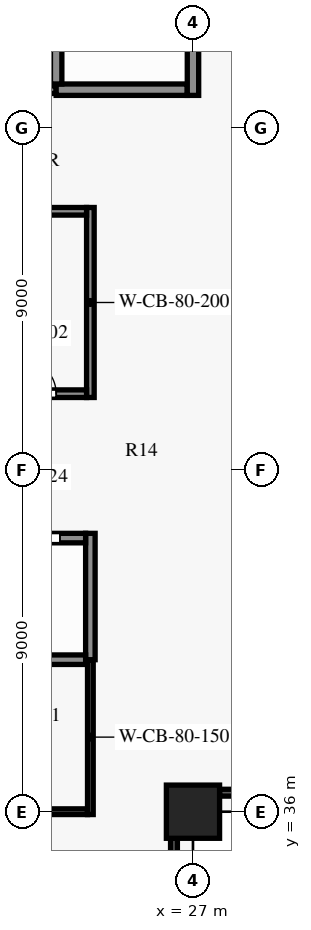
"""IFC4 building model, lengths in metres.
Left out: names, types, materials, properties, quantities, classifications, styles, units other than length and angle.
Written with IfcOpenShell. Run it as: python <this file> out.ifc"""

import sys

from ifc_helpers import new_model, si_unit, direction, frame, frame_2d, origin, origin_2d, place, context, subcontext, project, spatial, rectangle, extrude, element, fill, save


model = new_model("IFC4")
c1 = context("Model", 3, precision=1e-05, world=origin(), true_north=direction((0.0, 1.0)))
c2 = subcontext(c1, "Body", "Model", "MODEL_VIEW")
j1 = project(units=[si_unit("LENGTHUNIT", "METRE"), si_unit("PLANEANGLEUNIT", "RADIAN")], contexts=[c1])
p1 = place(None, origin())
s1 = spatial("IfcSite", under=j1, at=p1, CompositionType="ELEMENT")
p2 = place(p1, origin())
s2 = spatial("IfcBuilding", under=s1, at=p2, CompositionType="ELEMENT")
p3 = place(p2, frame((0.0, 0.0, 19.5)))
s3 = spatial("IfcBuildingStorey", under=s2, at=p3, CompositionType="ELEMENT", Elevation=19.5)
p4 = place(p3, frame((27.0, 36.0, 0.0), z_axis=(0.0, 0.0, 1.0), x_axis=(1.0, 0.0, 0.0)))
e1 = element("IfcColumn", 1, at=p4, inside=s3, PredefinedType="COLUMN", context=c2, shape_type="SweptSolid", body=[
    extrude(rectangle(XDim=1.4, YDim=1.4, at=origin_2d()), origin(), (0.0, 0.0, 1.0), 8.0),
])
p5 = place(p3, frame((12.4, 36.0, 0.0), z_axis=(0.0, 0.0, 1.0), x_axis=(1.0, 0.0, 0.0)))
e2 = element("IfcWall", 2, at=p5, inside=s3, PredefinedType="SHEAR", context=c2, shape_type="SweptSolid", body=[
    extrude(rectangle(XDim=11.825, YDim=0.15, at=frame_2d((5.913, 0.0))), origin(), (0.0, 0.0, 1.0), 7.7),
])
p6 = place(p5, frame((1.3, 0.0, 0.0)))
e3 = element("IfcOpeningElement", 3, at=p6, cuts=e2, PredefinedType="OPENING", context=c2, shape_type="SweptSolid", body=[
    extrude(rectangle(XDim=0.9, YDim=2.1, at=frame_2d((0.45, 1.05))), frame((0.0, 0.085, 0.0), z_axis=(0.0, -1.0, 0.0), x_axis=(1.0, 0.0, 0.0)), (0.0, 0.0, 1.0), 0.17),
])
p7 = place(p5, frame((4.8, 0.0, 0.0)))
e4 = element("IfcOpeningElement", 4, at=p7, cuts=e2, PredefinedType="OPENING", context=c2, shape_type="SweptSolid", body=[
    extrude(rectangle(XDim=0.9, YDim=2.1, at=frame_2d((0.45, 1.05))), frame((0.0, 0.085, 0.0), z_axis=(0.0, -1.0, 0.0), x_axis=(1.0, 0.0, 0.0)), (0.0, 0.0, 1.0), 0.17),
])
p8 = place(p5, frame((8.975, 0.0, 0.0)))
e5 = element("IfcOpeningElement", 5, at=p8, cuts=e2, PredefinedType="OPENING", context=c2, shape_type="SweptSolid", body=[
    extrude(rectangle(XDim=0.95, YDim=2.1, at=frame_2d((0.475, 1.05))), frame((0.0, 0.085, 0.0), z_axis=(0.0, -1.0, 0.0), x_axis=(1.0, 0.0, 0.0)), (0.0, 0.0, 1.0), 0.17),
])
p9 = place(p3, frame((8.1, 40.0, 0.0), z_axis=(0.0, 0.0, 1.0), x_axis=(1.0, 0.0, 0.0)))
e6 = element("IfcWall", 6, at=p9, inside=s3, PredefinedType="SHEAR", context=c2, shape_type="SweptSolid", body=[
    extrude(rectangle(XDim=16.075, YDim=0.25, at=frame_2d((8.038, 0.0))), origin(), (0.0, 0.0, 1.0), 7.7),
])
p10 = place(p3, frame((8.1, 43.2, 0.0), z_axis=(0.0, 0.0, 1.0), x_axis=(1.0, 0.0, 0.0)))
e7 = element("IfcWall", 7, at=p10, inside=s3, PredefinedType="SHEAR", context=c2, shape_type="SweptSolid", body=[
    extrude(rectangle(XDim=16.075, YDim=0.25, at=frame_2d((8.038, 0.0))), origin(), (0.0, 0.0, 1.0), 7.7),
])
p11 = place(p10, frame((14.3, 0.0, 0.0)))
e8 = element("IfcOpeningElement", 8, at=p11, cuts=e7, PredefinedType="OPENING", context=c2, shape_type="SweptSolid", body=[
    extrude(rectangle(XDim=1.1, YDim=2.1, at=frame_2d((0.55, 1.05))), frame((0.0, 0.135, 0.0), z_axis=(0.0, -1.0, 0.0), x_axis=(1.0, 0.0, 0.0)), (0.0, 0.0, 1.0), 0.27),
])
p12 = place(p10, frame((0.8, 0.0, 0.0)))
e9 = element("IfcOpeningElement", 9, at=p12, cuts=e7, PredefinedType="OPENING", context=c2, shape_type="SweptSolid", body=[
    extrude(rectangle(XDim=1.1, YDim=2.1, at=frame_2d((0.55, 1.05))), frame((0.0, 0.135, 0.0), z_axis=(0.0, -1.0, 0.0), x_axis=(1.0, 0.0, 0.0)), (0.0, 0.0, 1.0), 0.27),
])
p13 = place(p10, frame((3.5, 0.0, 0.0)))
e10 = element("IfcOpeningElement", 10, at=p13, cuts=e7, PredefinedType="OPENING", context=c2, shape_type="SweptSolid", body=[
    extrude(rectangle(XDim=1.1, YDim=2.1, at=frame_2d((0.55, 1.05))), frame((0.0, 0.135, 0.0), z_axis=(0.0, -1.0, 0.0), x_axis=(1.0, 0.0, 0.0)), (0.0, 0.0, 1.0), 0.27),
])
p14 = place(p10, frame((6.2, 0.0, 0.0)))
e11 = element("IfcOpeningElement", 11, at=p14, cuts=e7, PredefinedType="OPENING", context=c2, shape_type="SweptSolid", body=[
    extrude(rectangle(XDim=1.1, YDim=2.1, at=frame_2d((0.55, 1.05))), frame((0.0, 0.135, 0.0), z_axis=(0.0, -1.0, 0.0), x_axis=(1.0, 0.0, 0.0)), (0.0, 0.0, 1.0), 0.27),
])
p15 = place(p10, frame((8.9, 0.0, 0.0)))
e12 = element("IfcOpeningElement", 12, at=p15, cuts=e7, PredefinedType="OPENING", context=c2, shape_type="SweptSolid", body=[
    extrude(rectangle(XDim=1.1, YDim=2.1, at=frame_2d((0.55, 1.05))), frame((0.0, 0.135, 0.0), z_axis=(0.0, -1.0, 0.0), x_axis=(1.0, 0.0, 0.0)), (0.0, 0.0, 1.0), 0.27),
])
p16 = place(p10, frame((11.6, 0.0, 0.0)))
e13 = element("IfcOpeningElement", 13, at=p16, cuts=e7, PredefinedType="OPENING", context=c2, shape_type="SweptSolid", body=[
    extrude(rectangle(XDim=1.1, YDim=2.1, at=frame_2d((0.55, 1.05))), frame((0.0, 0.135, 0.0), z_axis=(0.0, -1.0, 0.0), x_axis=(1.0, 0.0, 0.0)), (0.0, 0.0, 1.0), 0.27),
])
p17 = place(p3, frame((21.6, 47.0, 0.0), z_axis=(0.0, 0.0, 1.0), x_axis=(1.0, 0.0, 0.0)))
e14 = element("IfcWall", 14, at=p17, inside=s3, PredefinedType="PARTITIONING", context=c2, shape_type="SweptSolid", body=[
    extrude(rectangle(XDim=2.6, YDim=0.2, at=frame_2d((1.3, 0.0))), origin(), (0.0, 0.0, 1.0), 7.7),
])
p18 = place(p17, frame((0.9, 0.0, 0.0)))
e15 = element("IfcOpeningElement", 15, at=p18, cuts=e14, PredefinedType="OPENING", context=c2, shape_type="SweptSolid", body=[
    extrude(rectangle(XDim=0.9, YDim=2.1, at=frame_2d((0.45, 1.05))), frame((0.0, 0.11, 0.0), z_axis=(0.0, -1.0, 0.0), x_axis=(1.0, 0.0, 0.0)), (0.0, 0.0, 1.0), 0.22),
])
p19 = place(p3, frame((21.6, 51.8, 0.0), z_axis=(0.0, 0.0, 1.0), x_axis=(1.0, 0.0, 0.0)))
e16 = element("IfcWall", 16, at=p19, inside=s3, PredefinedType="PARTITIONING", context=c2, shape_type="SweptSolid", body=[
    extrude(rectangle(XDim=2.6, YDim=0.2, at=frame_2d((1.3, 0.0))), origin(), (0.0, 0.0, 1.0), 7.7),
])
p20 = place(p3, frame((13.5, 55.0, 0.0), z_axis=(0.0, 0.0, 1.0), x_axis=(1.0, 0.0, 0.0)))
e17 = element("IfcWall", 17, at=p20, inside=s3, PredefinedType="PARTITIONING", context=c2, shape_type="SweptSolid", body=[
    extrude(rectangle(XDim=9.9, YDim=0.2, at=frame_2d((4.95, 0.0))), origin(), (0.0, 0.0, 1.0), 7.7),
])
p21 = place(p20, frame((4.45, 0.0, 0.0)))
e18 = element("IfcOpeningElement", 18, at=p21, cuts=e17, PredefinedType="OPENING", context=c2, shape_type="SweptSolid", body=[
    extrude(rectangle(XDim=1.0, YDim=2.1, at=frame_2d((0.5, 1.05))), frame((0.0, 0.11, 0.0), z_axis=(0.0, -1.0, 0.0), x_axis=(1.0, 0.0, 0.0)), (0.0, 0.0, 1.0), 0.22),
])
p22 = place(p3, frame((23.4, 55.0, 0.0), z_axis=(0.0, 0.0, 1.0), x_axis=(1.0, 0.0, 0.0)))
e19 = element("IfcWall", 19, at=p22, inside=s3, PredefinedType="SHEAR", context=c2, shape_type="SweptSolid", body=[
    extrude(rectangle(XDim=3.45, YDim=0.3, at=frame_2d((1.725, 0.0))), origin(), (0.0, 0.0, 1.0), 7.7),
])
p23 = place(p3, frame((23.4, 55.15, 0.0), z_axis=(0.0, 0.0, 1.0), x_axis=(0.0, 1.0, 0.0)))
e20 = element("IfcWall", 20, at=p23, inside=s3, PredefinedType="SHEAR", context=c2, shape_type="SweptSolid", body=[
    extrude(rectangle(XDim=8.0, YDim=0.3, at=frame_2d((4.0, 0.0))), origin(), (0.0, 0.0, 1.0), 7.7),
])
p24 = place(p3, frame((24.3, 35.925, 0.0), z_axis=(0.0, 0.0, 1.0), x_axis=(0.0, 1.0, 0.0)))
e21 = element("IfcWall", 21, at=p24, inside=s3, PredefinedType="SHEAR", context=c2, shape_type="SweptSolid", body=[
    extrude(rectangle(XDim=4.075, YDim=0.15, at=frame_2d((2.038, 0.0))), origin(), (0.0, 0.0, 1.0), 7.7),
])
p25 = place(p3, frame((24.3, 46.9, 0.0), z_axis=(0.0, 0.0, 1.0), x_axis=(0.0, 1.0, 0.0)))
e22 = element("IfcWall", 22, at=p25, inside=s3, PredefinedType="SHEAR", context=c2, shape_type="SweptSolid", body=[
    extrude(rectangle(XDim=5.0, YDim=0.2, at=frame_2d((2.5, 0.0))), origin(), (0.0, 0.0, 1.0), 7.7),
])
p26 = place(p3, frame((24.3, 40.0, 0.0), z_axis=(0.0, 0.0, 1.0), x_axis=(0.0, 1.0, 0.0)))
e23 = element("IfcWall", 23, at=p26, inside=s3, PredefinedType="SHEAR", context=c2, shape_type="SweptSolid", body=[
    extrude(rectangle(XDim=3.325, YDim=0.25, at=frame_2d((1.663, 0.0))), origin(), (0.0, 0.0, 1.0), 7.7),
])
p27 = place(p3, frame((27.0, 54.85, 0.0), z_axis=(0.0, 0.0, 1.0), x_axis=(0.0, 1.0, 0.0)))
e24 = element("IfcWall", 24, at=p27, inside=s3, PredefinedType="SHEAR", context=c2, shape_type="SweptSolid", body=[
    extrude(rectangle(XDim=8.35, YDim=0.3, at=frame_2d((4.175, 0.0))), origin(), (0.0, 0.0, 1.0), 7.7),
])
p28 = place(p27, frame((6.55, 0.0, 0.0)))
e25 = element("IfcOpeningElement", 25, at=p28, cuts=e24, PredefinedType="OPENING", context=c2, shape_type="SweptSolid", body=[
    extrude(rectangle(XDim=1.2, YDim=2.2, at=frame_2d((0.6, 1.1))), frame((0.0, 0.16, 0.0), z_axis=(0.0, -1.0, 0.0), x_axis=(1.0, 0.0, 0.0)), (0.0, 0.0, 1.0), 0.32),
])
p29 = place(p18, origin())
e26 = element("IfcDoor", 26, at=p29, inside=s3, OperationType="SINGLE_SWING_LEFT", PredefinedType="DOOR", context=c2, shape_type="SweptSolid", body=[
    extrude(rectangle(XDim=0.9, YDim=2.1, at=frame_2d((0.45, 1.05))), frame((0.0, 0.025, 0.0), z_axis=(0.0, -1.0, 0.0), x_axis=(1.0, 0.0, 0.0)), (0.0, 0.0, 1.0), 0.05),
])
fill(e15, e26)
p30 = place(p11, origin())
e27 = element("IfcDoor", 27, at=p30, inside=s3, OperationType="DOUBLE_DOOR_SLIDING", PredefinedType="DOOR", context=c2, shape_type="SweptSolid", body=[
    extrude(rectangle(XDim=1.1, YDim=2.1, at=frame_2d((0.55, 1.05))), frame((0.0, 0.025, 0.0), z_axis=(0.0, -1.0, 0.0), x_axis=(1.0, 0.0, 0.0)), (0.0, 0.0, 1.0), 0.05),
])
fill(e8, e27)
save(model, sys.argv[1])
